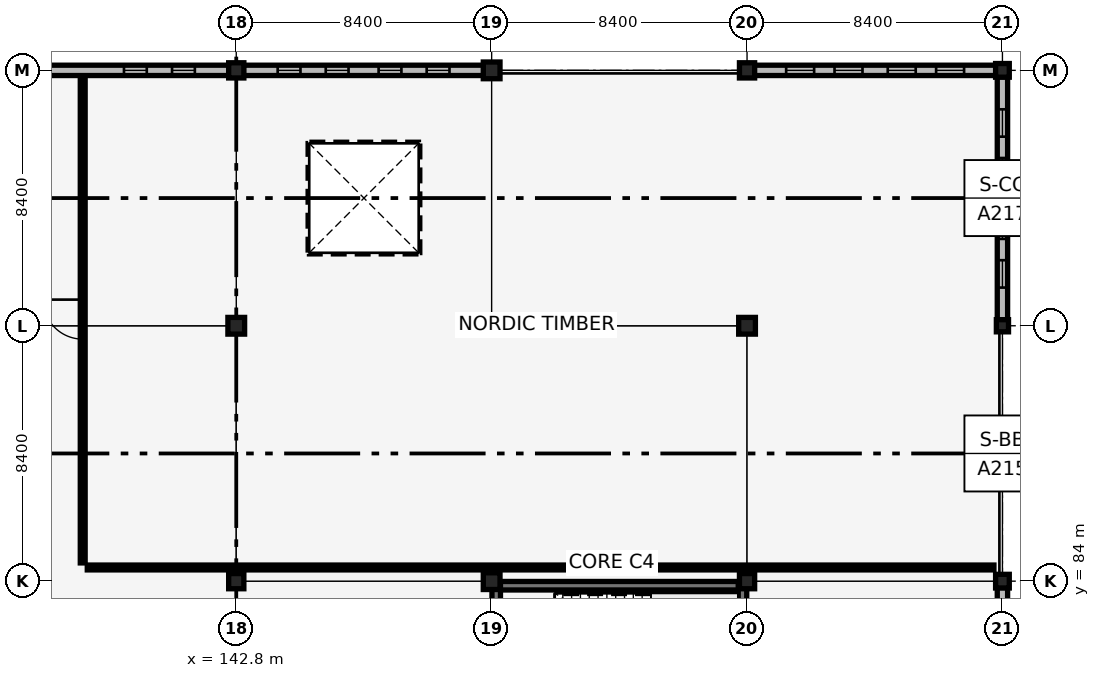
"""IFC4 building model, lengths in metres.
Left out: names, types, materials, properties, quantities, classifications, styles, units other than length and angle.
Written with IfcOpenShell. Run it as: python <this file> out.ifc"""

import sys

from ifc_helpers import new_model, si_unit, direction, frame, frame_2d, origin, origin_2d, place, context, subcontext, project, spatial, rectangle, extrude, element, fill, save


model = new_model("IFC4")
c1 = context("Model", 3, precision=1e-05, world=origin(), true_north=direction((0.0, 1.0)))
c2 = subcontext(c1, "Body", "Model", "MODEL_VIEW")
j1 = project(units=[si_unit("LENGTHUNIT", "METRE"), si_unit("PLANEANGLEUNIT", "RADIAN")], contexts=[c1])
p1 = place(None, origin())
s1 = spatial("IfcSite", under=j1, at=p1, CompositionType="ELEMENT")
p2 = place(p1, origin())
s2 = spatial("IfcBuilding", under=s1, at=p2, CompositionType="ELEMENT")
p3 = place(p2, frame((0.0, 0.0, 22.1)))
s3 = spatial("IfcBuildingStorey", under=s2, at=p3, CompositionType="ELEMENT", Elevation=22.1)
p4 = place(p3, frame((151.35, 83.85, 0.0), z_axis=(0.0, 0.0, 1.0), x_axis=(1.0, 0.0, 0.0)))
e1 = element("IfcWall", 1, at=p4, inside=s3, PredefinedType="SHEAR", context=c2, shape_type="SweptSolid", body=[
    extrude(rectangle(XDim=8.1, YDim=0.28, at=frame_2d((4.05, 0.0))), origin(), (0.0, 0.0, 1.0), 3.78),
])
p5 = place(p3, frame((151.35, 75.75, 0.0), z_axis=(0.0, 0.0, 1.0), x_axis=(0.0, 1.0, 0.0)))
e2 = element("IfcWall", 2, at=p5, inside=s3, PredefinedType="SHEAR", context=c2, shape_type="SweptSolid", body=[
    extrude(rectangle(XDim=8.1, YDim=0.28, at=frame_2d((4.05, 0.0))), origin(), (0.0, 0.0, 1.0), 3.78),
])
p6 = place(p5, frame((1.325, 0.0, 0.0)))
e3 = element("IfcOpeningElement", 3, at=p6, cuts=e2, PredefinedType="OPENING", context=c2, shape_type="SweptSolid", body=[
    extrude(rectangle(XDim=1.45, YDim=2.15, at=frame_2d((0.725, 1.075))), frame((0.0, 0.15, 0.0), z_axis=(0.0, -1.0, 0.0), x_axis=(1.0, 0.0, 0.0)), (0.0, 0.0, 1.0), 0.3),
])
p7 = place(p3, frame((159.45, 75.75, 0.0), z_axis=(0.0, 0.0, 1.0), x_axis=(0.0, 1.0, 0.0)))
e4 = element("IfcWall", 4, at=p7, inside=s3, PredefinedType="SHEAR", context=c2, shape_type="SweptSolid", body=[
    extrude(rectangle(XDim=8.1, YDim=0.28, at=frame_2d((4.05, 0.0))), origin(), (0.0, 0.0, 1.0), 3.78),
])
p8 = place(p3, frame((142.8, 84.0, 0.0), z_axis=(0.0, 0.0, 1.0), x_axis=(1.0, 0.0, 0.0)))
e5 = element("IfcColumn", 5, at=p8, inside=s3, PredefinedType="COLUMN", context=c2, shape_type="SweptSolid", body=[
    extrude(rectangle(XDim=0.5, YDim=0.5, at=origin_2d()), origin(), (0.0, 0.0, 1.0), 3.78),
])
p9 = place(p3, frame((142.8, 92.4, 0.0), z_axis=(0.0, 0.0, 1.0), x_axis=(1.0, 0.0, 0.0)))
e6 = element("IfcColumn", 6, at=p9, inside=s3, PredefinedType="COLUMN", context=c2, shape_type="SweptSolid", body=[
    extrude(rectangle(XDim=0.55, YDim=0.55, at=origin_2d()), origin(), (0.0, 0.0, 1.0), 3.78),
])
p10 = place(p3, frame((142.8, 100.8, 0.0), z_axis=(0.0, 0.0, 1.0), x_axis=(1.0, 0.0, 0.0)))
e7 = element("IfcColumn", 7, at=p10, inside=s3, PredefinedType="COLUMN", context=c2, shape_type="SweptSolid", body=[
    extrude(rectangle(XDim=0.5, YDim=0.5, at=origin_2d()), origin(), (0.0, 0.0, 1.0), 3.78),
])
p11 = place(p3, frame((151.2, 84.0, 0.0), z_axis=(0.0, 0.0, 1.0), x_axis=(1.0, 0.0, 0.0)))
e8 = element("IfcColumn", 8, at=p11, inside=s3, PredefinedType="COLUMN", context=c2, shape_type="SweptSolid", body=[
    extrude(rectangle(XDim=0.55, YDim=0.55, at=origin_2d()), origin(), (0.0, 0.0, 1.0), 3.78),
])
p12 = place(p3, frame((151.2, 92.4, 0.0), z_axis=(0.0, 0.0, 1.0), x_axis=(1.0, 0.0, 0.0)))
e9 = element("IfcColumn", 9, at=p12, inside=s3, PredefinedType="COLUMN", context=c2, shape_type="SweptSolid", body=[
    extrude(rectangle(XDim=0.52, YDim=0.52, at=origin_2d()), origin(), (0.0, 0.0, 1.0), 3.78),
])
p13 = place(p3, frame((151.2, 100.8, 0.0), z_axis=(0.0, 0.0, 1.0), x_axis=(1.0, 0.0, 0.0)))
e10 = element("IfcColumn", 10, at=p13, inside=s3, PredefinedType="COLUMN", context=c2, shape_type="SweptSolid", body=[
    extrude(rectangle(XDim=0.55, YDim=0.55, at=origin_2d()), origin(), (0.0, 0.0, 1.0), 3.78),
])
p14 = place(p3, frame((159.6, 84.0, 0.0), z_axis=(0.0, 0.0, 1.0), x_axis=(1.0, 0.0, 0.0)))
e11 = element("IfcColumn", 11, at=p14, inside=s3, PredefinedType="COLUMN", context=c2, shape_type="SweptSolid", body=[
    extrude(rectangle(XDim=0.5, YDim=0.5, at=origin_2d()), origin(), (0.0, 0.0, 1.0), 3.78),
])
p15 = place(p3, frame((159.6, 92.4, 0.0), z_axis=(0.0, 0.0, 1.0), x_axis=(1.0, 0.0, 0.0)))
e12 = element("IfcColumn", 12, at=p15, inside=s3, PredefinedType="COLUMN", context=c2, shape_type="SweptSolid", body=[
    extrude(rectangle(XDim=0.55, YDim=0.55, at=origin_2d()), origin(), (0.0, 0.0, 1.0), 3.78),
])
p16 = place(p3, frame((159.6, 100.8, 0.0), z_axis=(0.0, 0.0, 1.0), x_axis=(1.0, 0.0, 0.0)))
e13 = element("IfcColumn", 13, at=p16, inside=s3, PredefinedType="COLUMN", context=c2, shape_type="SweptSolid", body=[
    extrude(rectangle(XDim=0.5, YDim=0.5, at=origin_2d()), origin(), (0.0, 0.0, 1.0), 3.78),
])
p17 = place(p3, frame((168.0, 84.0, 0.0), z_axis=(0.0, 0.0, 1.0), x_axis=(1.0, 0.0, 0.0)))
e14 = element("IfcColumn", 14, at=p17, inside=s3, PredefinedType="COLUMN", context=c2, shape_type="SweptSolid", body=[
    extrude(rectangle(XDim=0.45, YDim=0.45, at=origin_2d()), origin(), (0.0, 0.0, 1.0), 3.78),
])
p18 = place(p3, frame((168.0, 92.4, 0.0), z_axis=(0.0, 0.0, 1.0), x_axis=(1.0, 0.0, 0.0)))
e15 = element("IfcColumn", 15, at=p18, inside=s3, PredefinedType="COLUMN", context=c2, shape_type="SweptSolid", body=[
    extrude(rectangle(XDim=0.4, YDim=0.4, at=origin_2d()), origin(), (0.0, 0.0, 1.0), 3.78),
])
p19 = place(p3, frame((168.0, 100.8, 0.0), z_axis=(0.0, 0.0, 1.0), x_axis=(1.0, 0.0, 0.0)))
e16 = element("IfcColumn", 16, at=p19, inside=s3, PredefinedType="COLUMN", context=c2, shape_type="SweptSolid", body=[
    extrude(rectangle(XDim=0.45, YDim=0.45, at=origin_2d()), origin(), (0.0, 0.0, 1.0), 3.78),
])
p20 = place(p3, frame((134.66, 100.8, 0.0), z_axis=(0.0, 0.0, 1.0), x_axis=(1.0, 0.0, 0.0)))
e17 = element("IfcWall", 17, at=p20, inside=s3, PredefinedType="SOLIDWALL", context=c2, shape_type="SweptSolid", body=[
    extrude(rectangle(XDim=7.905, YDim=0.34, at=frame_2d((3.953, 0.0))), origin(), (0.0, 0.0, 1.0), 3.18),
])
p21 = place(p20, frame((1.127, 0.0, 0.7)))
e18 = element("IfcOpeningElement", 18, at=p21, cuts=e17, PredefinedType="OPENING", context=c2, shape_type="SweptSolid", body=[
    extrude(rectangle(XDim=0.75, YDim=2.1, at=frame_2d((0.375, 1.05))), frame((0.0, 0.18, 0.0), z_axis=(0.0, -1.0, 0.0), x_axis=(1.0, 0.0, 0.0)), (0.0, 0.0, 1.0), 0.36),
])
p22 = place(p20, frame((4.447, 0.0, 0.7)))
e19 = element("IfcOpeningElement", 19, at=p22, cuts=e17, PredefinedType="OPENING", context=c2, shape_type="SweptSolid", body=[
    extrude(rectangle(XDim=0.75, YDim=2.1, at=frame_2d((0.375, 1.05))), frame((0.0, 0.18, 0.0), z_axis=(0.0, -1.0, 0.0), x_axis=(1.0, 0.0, 0.0)), (0.0, 0.0, 1.0), 0.36),
])
p23 = place(p20, frame((6.028, 0.0, 0.7)))
e20 = element("IfcOpeningElement", 20, at=p23, cuts=e17, PredefinedType="OPENING", context=c2, shape_type="SweptSolid", body=[
    extrude(rectangle(XDim=0.75, YDim=2.1, at=frame_2d((0.375, 1.05))), frame((0.0, 0.18, 0.0), z_axis=(0.0, -1.0, 0.0), x_axis=(1.0, 0.0, 0.0)), (0.0, 0.0, 1.0), 0.36),
])
p24 = place(p3, frame((143.035, 100.8, 0.0), z_axis=(0.0, 0.0, 1.0), x_axis=(1.0, 0.0, 0.0)))
e21 = element("IfcWall", 21, at=p24, inside=s3, PredefinedType="SOLIDWALL", context=c2, shape_type="SweptSolid", body=[
    extrude(rectangle(XDim=7.905, YDim=0.34, at=frame_2d((3.953, 0.0))), origin(), (0.0, 0.0, 1.0), 3.18),
])
p25 = place(p24, frame((1.127, 0.0, 0.7)))
e22 = element("IfcOpeningElement", 22, at=p25, cuts=e21, PredefinedType="OPENING", context=c2, shape_type="SweptSolid", body=[
    extrude(rectangle(XDim=0.75, YDim=2.1, at=frame_2d((0.375, 1.05))), frame((0.0, 0.18, 0.0), z_axis=(0.0, -1.0, 0.0), x_axis=(1.0, 0.0, 0.0)), (0.0, 0.0, 1.0), 0.36),
])
p26 = place(p24, frame((2.708, 0.0, 0.7)))
e23 = element("IfcOpeningElement", 23, at=p26, cuts=e21, PredefinedType="OPENING", context=c2, shape_type="SweptSolid", body=[
    extrude(rectangle(XDim=0.75, YDim=2.1, at=frame_2d((0.375, 1.05))), frame((0.0, 0.18, 0.0), z_axis=(0.0, -1.0, 0.0), x_axis=(1.0, 0.0, 0.0)), (0.0, 0.0, 1.0), 0.36),
])
p27 = place(p24, frame((4.447, 0.0, 0.7)))
e24 = element("IfcOpeningElement", 24, at=p27, cuts=e21, PredefinedType="OPENING", context=c2, shape_type="SweptSolid", body=[
    extrude(rectangle(XDim=0.75, YDim=2.1, at=frame_2d((0.375, 1.05))), frame((0.0, 0.18, 0.0), z_axis=(0.0, -1.0, 0.0), x_axis=(1.0, 0.0, 0.0)), (0.0, 0.0, 1.0), 0.36),
])
p28 = place(p24, frame((6.028, 0.0, 0.7)))
e25 = element("IfcOpeningElement", 25, at=p28, cuts=e21, PredefinedType="OPENING", context=c2, shape_type="SweptSolid", body=[
    extrude(rectangle(XDim=0.75, YDim=2.1, at=frame_2d((0.375, 1.05))), frame((0.0, 0.18, 0.0), z_axis=(0.0, -1.0, 0.0), x_axis=(1.0, 0.0, 0.0)), (0.0, 0.0, 1.0), 0.36),
])
p29 = place(p3, frame((168.0, 75.785, 0.0), z_axis=(0.0, 0.0, 1.0), x_axis=(0.0, 1.0, 0.0)))
e26 = element("IfcWall", 26, at=p29, inside=s3, PredefinedType="SOLIDWALL", context=c2, shape_type="SweptSolid", body=[
    extrude(rectangle(XDim=8.005, YDim=0.34, at=frame_2d((4.002, 0.0))), origin(), (0.0, 0.0, 1.0), 3.78),
])
p30 = place(p29, frame((1.121, 0.0, 0.75)))
e27 = element("IfcOpeningElement", 27, at=p30, cuts=e26, PredefinedType="OPENING", context=c2, shape_type="SweptSolid", body=[
    extrude(rectangle(XDim=0.8, YDim=2.55, at=frame_2d((0.4, 1.275))), frame((0.0, 0.18, 0.0), z_axis=(0.0, -1.0, 0.0), x_axis=(1.0, 0.0, 0.0)), (0.0, 0.0, 1.0), 0.36),
])
p31 = place(p29, frame((2.722, 0.0, 0.75)))
e28 = element("IfcOpeningElement", 28, at=p31, cuts=e26, PredefinedType="OPENING", context=c2, shape_type="SweptSolid", body=[
    extrude(rectangle(XDim=0.8, YDim=2.55, at=frame_2d((0.4, 1.275))), frame((0.0, 0.18, 0.0), z_axis=(0.0, -1.0, 0.0), x_axis=(1.0, 0.0, 0.0)), (0.0, 0.0, 1.0), 0.36),
])
p32 = place(p29, frame((4.483, 0.0, 0.75)))
e29 = element("IfcOpeningElement", 29, at=p32, cuts=e26, PredefinedType="OPENING", context=c2, shape_type="SweptSolid", body=[
    extrude(rectangle(XDim=0.8, YDim=2.55, at=frame_2d((0.4, 1.275))), frame((0.0, 0.18, 0.0), z_axis=(0.0, -1.0, 0.0), x_axis=(1.0, 0.0, 0.0)), (0.0, 0.0, 1.0), 0.36),
])
p33 = place(p29, frame((6.084, 0.0, 0.75)))
e30 = element("IfcOpeningElement", 30, at=p33, cuts=e26, PredefinedType="OPENING", context=c2, shape_type="SweptSolid", body=[
    extrude(rectangle(XDim=0.8, YDim=2.55, at=frame_2d((0.4, 1.275))), frame((0.0, 0.18, 0.0), z_axis=(0.0, -1.0, 0.0), x_axis=(1.0, 0.0, 0.0)), (0.0, 0.0, 1.0), 0.36),
])
p34 = place(p3, frame((159.835, 100.8, 0.0), z_axis=(0.0, 0.0, 1.0), x_axis=(1.0, 0.0, 0.0)))
e31 = element("IfcWall", 31, at=p34, inside=s3, PredefinedType="SOLIDWALL", context=c2, shape_type="SweptSolid", body=[
    extrude(rectangle(XDim=7.955, YDim=0.34, at=frame_2d((3.978, 0.0))), origin(), (0.0, 0.0, 1.0), 3.78),
])
p35 = place(p34, frame((1.052, 0.0, 0.75)))
e32 = element("IfcOpeningElement", 32, at=p35, cuts=e31, PredefinedType="OPENING", context=c2, shape_type="SweptSolid", body=[
    extrude(rectangle(XDim=0.92, YDim=2.5, at=frame_2d((0.46, 1.25))), frame((0.0, 0.18, 0.0), z_axis=(0.0, -1.0, 0.0), x_axis=(1.0, 0.0, 0.0)), (0.0, 0.0, 1.0), 0.36),
])
p36 = place(p34, frame((2.642, 0.0, 0.75)))
e33 = element("IfcOpeningElement", 33, at=p36, cuts=e31, PredefinedType="OPENING", context=c2, shape_type="SweptSolid", body=[
    extrude(rectangle(XDim=0.92, YDim=2.5, at=frame_2d((0.46, 1.25))), frame((0.0, 0.18, 0.0), z_axis=(0.0, -1.0, 0.0), x_axis=(1.0, 0.0, 0.0)), (0.0, 0.0, 1.0), 0.36),
])
p37 = place(p34, frame((4.393, 0.0, 0.75)))
e34 = element("IfcOpeningElement", 34, at=p37, cuts=e31, PredefinedType="OPENING", context=c2, shape_type="SweptSolid", body=[
    extrude(rectangle(XDim=0.92, YDim=2.5, at=frame_2d((0.46, 1.25))), frame((0.0, 0.18, 0.0), z_axis=(0.0, -1.0, 0.0), x_axis=(1.0, 0.0, 0.0)), (0.0, 0.0, 1.0), 0.36),
])
p38 = place(p34, frame((5.984, 0.0, 0.75)))
e35 = element("IfcOpeningElement", 35, at=p38, cuts=e31, PredefinedType="OPENING", context=c2, shape_type="SweptSolid", body=[
    extrude(rectangle(XDim=0.92, YDim=2.5, at=frame_2d((0.46, 1.25))), frame((0.0, 0.18, 0.0), z_axis=(0.0, -1.0, 0.0), x_axis=(1.0, 0.0, 0.0)), (0.0, 0.0, 1.0), 0.36),
])
p39 = place(p3, frame((168.0, 92.585, 0.0), z_axis=(0.0, 0.0, 1.0), x_axis=(0.0, 1.0, 0.0)))
e36 = element("IfcWall", 36, at=p39, inside=s3, PredefinedType="SOLIDWALL", context=c2, shape_type="SweptSolid", body=[
    extrude(rectangle(XDim=8.005, YDim=0.34, at=frame_2d((4.002, 0.0))), origin(), (0.0, 0.0, 1.0), 3.78),
])
p40 = place(p39, frame((1.071, 0.0, 0.75)))
e37 = element("IfcOpeningElement", 37, at=p40, cuts=e36, PredefinedType="OPENING", context=c2, shape_type="SweptSolid", body=[
    extrude(rectangle(XDim=0.9, YDim=2.65, at=frame_2d((0.45, 1.325))), frame((0.0, 0.18, 0.0), z_axis=(0.0, -1.0, 0.0), x_axis=(1.0, 0.0, 0.0)), (0.0, 0.0, 1.0), 0.36),
])
p41 = place(p39, frame((2.672, 0.0, 0.75)))
e38 = element("IfcOpeningElement", 38, at=p41, cuts=e36, PredefinedType="OPENING", context=c2, shape_type="SweptSolid", body=[
    extrude(rectangle(XDim=0.9, YDim=2.65, at=frame_2d((0.45, 1.325))), frame((0.0, 0.18, 0.0), z_axis=(0.0, -1.0, 0.0), x_axis=(1.0, 0.0, 0.0)), (0.0, 0.0, 1.0), 0.36),
])
p42 = place(p39, frame((4.433, 0.0, 0.75)))
e39 = element("IfcOpeningElement", 39, at=p42, cuts=e36, PredefinedType="OPENING", context=c2, shape_type="SweptSolid", body=[
    extrude(rectangle(XDim=0.9, YDim=2.65, at=frame_2d((0.45, 1.325))), frame((0.0, 0.18, 0.0), z_axis=(0.0, -1.0, 0.0), x_axis=(1.0, 0.0, 0.0)), (0.0, 0.0, 1.0), 0.36),
])
p43 = place(p39, frame((6.034, 0.0, 0.75)))
e40 = element("IfcOpeningElement", 40, at=p43, cuts=e36, PredefinedType="OPENING", context=c2, shape_type="SweptSolid", body=[
    extrude(rectangle(XDim=0.9, YDim=2.65, at=frame_2d((0.45, 1.325))), frame((0.0, 0.18, 0.0), z_axis=(0.0, -1.0, 0.0), x_axis=(1.0, 0.0, 0.0)), (0.0, 0.0, 1.0), 0.36),
])
p44 = place(p3, frame((137.75, 84.6, 0.0), z_axis=(0.0, 0.0, 1.0), x_axis=(0.0, 1.0, 0.0)))
e41 = element("IfcWall", 41, at=p44, inside=s3, PredefinedType="PARTITIONING", context=c2, shape_type="SweptSolid", body=[
    extrude(rectangle(XDim=16.02, YDim=0.16, at=frame_2d((8.01, 0.0))), origin(), (0.0, 0.0, 1.0), 3.16),
])
p45 = place(p44, frame((7.36, 0.0, 0.0)))
e42 = element("IfcOpeningElement", 42, at=p45, cuts=e41, PredefinedType="OPENING", context=c2, shape_type="SweptSolid", body=[
    extrude(rectangle(XDim=1.3, YDim=2.2, at=frame_2d((0.65, 1.1))), frame((0.0, 0.09, 0.0), z_axis=(0.0, -1.0, 0.0), x_axis=(1.0, 0.0, 0.0)), (0.0, 0.0, 1.0), 0.18),
])
p46 = place(p3, frame((137.9, 84.45, 0.0), z_axis=(0.0, 0.0, 1.0), x_axis=(1.0, 0.0, 0.0)))
e43 = element("IfcWall", 43, at=p46, inside=s3, PredefinedType="PARTITIONING", context=c2, shape_type="SweptSolid", body=[
    extrude(rectangle(XDim=29.82, YDim=0.16, at=frame_2d((14.91, 0.0))), origin(), (0.0, 0.0, 1.0), 3.13),
])
p47 = place(p22, origin())
e44 = element("IfcWindow", 44, at=p47, inside=s3, PartitioningType="DOUBLE_PANEL_VERTICAL", PredefinedType="WINDOW", context=c2, shape_type="SweptSolid", body=[
    extrude(rectangle(XDim=0.75, YDim=2.1, at=frame_2d((0.375, 1.05))), frame((0.0, 0.03, 0.0), z_axis=(0.0, -1.0, 0.0), x_axis=(1.0, 0.0, 0.0)), (0.0, 0.0, 1.0), 0.06),
])
fill(e19, e44)
p48 = place(p23, origin())
e45 = element("IfcWindow", 45, at=p48, inside=s3, PartitioningType="DOUBLE_PANEL_VERTICAL", PredefinedType="WINDOW", context=c2, shape_type="SweptSolid", body=[
    extrude(rectangle(XDim=0.75, YDim=2.1, at=frame_2d((0.375, 1.05))), frame((0.0, 0.03, 0.0), z_axis=(0.0, -1.0, 0.0), x_axis=(1.0, 0.0, 0.0)), (0.0, 0.0, 1.0), 0.06),
])
fill(e20, e45)
p49 = place(p25, origin())
e46 = element("IfcWindow", 46, at=p49, inside=s3, PartitioningType="DOUBLE_PANEL_VERTICAL", PredefinedType="WINDOW", context=c2, shape_type="SweptSolid", body=[
    extrude(rectangle(XDim=0.75, YDim=2.1, at=frame_2d((0.375, 1.05))), frame((0.0, 0.03, 0.0), z_axis=(0.0, -1.0, 0.0), x_axis=(1.0, 0.0, 0.0)), (0.0, 0.0, 1.0), 0.06),
])
fill(e22, e46)
p50 = place(p26, origin())
e47 = element("IfcWindow", 47, at=p50, inside=s3, PartitioningType="DOUBLE_PANEL_VERTICAL", PredefinedType="WINDOW", context=c2, shape_type="SweptSolid", body=[
    extrude(rectangle(XDim=0.75, YDim=2.1, at=frame_2d((0.375, 1.05))), frame((0.0, 0.03, 0.0), z_axis=(0.0, -1.0, 0.0), x_axis=(1.0, 0.0, 0.0)), (0.0, 0.0, 1.0), 0.06),
])
fill(e23, e47)
p51 = place(p27, origin())
e48 = element("IfcWindow", 48, at=p51, inside=s3, PartitioningType="DOUBLE_PANEL_VERTICAL", PredefinedType="WINDOW", context=c2, shape_type="SweptSolid", body=[
    extrude(rectangle(XDim=0.75, YDim=2.1, at=frame_2d((0.375, 1.05))), frame((0.0, 0.03, 0.0), z_axis=(0.0, -1.0, 0.0), x_axis=(1.0, 0.0, 0.0)), (0.0, 0.0, 1.0), 0.06),
])
fill(e24, e48)
p52 = place(p28, origin())
e49 = element("IfcWindow", 49, at=p52, inside=s3, PartitioningType="DOUBLE_PANEL_VERTICAL", PredefinedType="WINDOW", context=c2, shape_type="SweptSolid", body=[
    extrude(rectangle(XDim=0.75, YDim=2.1, at=frame_2d((0.375, 1.05))), frame((0.0, 0.03, 0.0), z_axis=(0.0, -1.0, 0.0), x_axis=(1.0, 0.0, 0.0)), (0.0, 0.0, 1.0), 0.06),
])
fill(e25, e49)
p53 = place(p35, origin())
e50 = element("IfcWindow", 50, at=p53, inside=s3, PartitioningType="DOUBLE_PANEL_VERTICAL", PredefinedType="WINDOW", context=c2, shape_type="SweptSolid", body=[
    extrude(rectangle(XDim=0.92, YDim=2.5, at=frame_2d((0.46, 1.25))), frame((0.0, 0.03, 0.0), z_axis=(0.0, -1.0, 0.0), x_axis=(1.0, 0.0, 0.0)), (0.0, 0.0, 1.0), 0.06),
])
fill(e32, e50)
p54 = place(p36, origin())
e51 = element("IfcWindow", 51, at=p54, inside=s3, PartitioningType="DOUBLE_PANEL_VERTICAL", PredefinedType="WINDOW", context=c2, shape_type="SweptSolid", body=[
    extrude(rectangle(XDim=0.92, YDim=2.5, at=frame_2d((0.46, 1.25))), frame((0.0, 0.03, 0.0), z_axis=(0.0, -1.0, 0.0), x_axis=(1.0, 0.0, 0.0)), (0.0, 0.0, 1.0), 0.06),
])
fill(e33, e51)
p55 = place(p37, origin())
e52 = element("IfcWindow", 52, at=p55, inside=s3, PartitioningType="DOUBLE_PANEL_VERTICAL", PredefinedType="WINDOW", context=c2, shape_type="SweptSolid", body=[
    extrude(rectangle(XDim=0.92, YDim=2.5, at=frame_2d((0.46, 1.25))), frame((0.0, 0.03, 0.0), z_axis=(0.0, -1.0, 0.0), x_axis=(1.0, 0.0, 0.0)), (0.0, 0.0, 1.0), 0.06),
])
fill(e34, e52)
p56 = place(p38, origin())
e53 = element("IfcWindow", 53, at=p56, inside=s3, PartitioningType="DOUBLE_PANEL_VERTICAL", PredefinedType="WINDOW", context=c2, shape_type="SweptSolid", body=[
    extrude(rectangle(XDim=0.92, YDim=2.5, at=frame_2d((0.46, 1.25))), frame((0.0, 0.03, 0.0), z_axis=(0.0, -1.0, 0.0), x_axis=(1.0, 0.0, 0.0)), (0.0, 0.0, 1.0), 0.06),
])
fill(e35, e53)
p57 = place(p40, origin())
e54 = element("IfcWindow", 54, at=p57, inside=s3, PartitioningType="DOUBLE_PANEL_VERTICAL", PredefinedType="WINDOW", context=c2, shape_type="SweptSolid", body=[
    extrude(rectangle(XDim=0.9, YDim=2.65, at=frame_2d((0.45, 1.325))), frame((0.0, 0.03, 0.0), z_axis=(0.0, -1.0, 0.0), x_axis=(1.0, 0.0, 0.0)), (0.0, 0.0, 1.0), 0.06),
])
fill(e37, e54)
p58 = place(p41, origin())
e55 = element("IfcWindow", 55, at=p58, inside=s3, PartitioningType="DOUBLE_PANEL_VERTICAL", PredefinedType="WINDOW", context=c2, shape_type="SweptSolid", body=[
    extrude(rectangle(XDim=0.9, YDim=2.65, at=frame_2d((0.45, 1.325))), frame((0.0, 0.03, 0.0), z_axis=(0.0, -1.0, 0.0), x_axis=(1.0, 0.0, 0.0)), (0.0, 0.0, 1.0), 0.06),
])
fill(e38, e55)
p59 = place(p42, origin())
e56 = element("IfcWindow", 56, at=p59, inside=s3, PartitioningType="DOUBLE_PANEL_VERTICAL", PredefinedType="WINDOW", context=c2, shape_type="SweptSolid", body=[
    extrude(rectangle(XDim=0.9, YDim=2.65, at=frame_2d((0.45, 1.325))), frame((0.0, 0.03, 0.0), z_axis=(0.0, -1.0, 0.0), x_axis=(1.0, 0.0, 0.0)), (0.0, 0.0, 1.0), 0.06),
])
fill(e39, e56)
p60 = place(p43, origin())
e57 = element("IfcWindow", 57, at=p60, inside=s3, PartitioningType="DOUBLE_PANEL_VERTICAL", PredefinedType="WINDOW", context=c2, shape_type="SweptSolid", body=[
    extrude(rectangle(XDim=0.9, YDim=2.65, at=frame_2d((0.45, 1.325))), frame((0.0, 0.03, 0.0), z_axis=(0.0, -1.0, 0.0), x_axis=(1.0, 0.0, 0.0)), (0.0, 0.0, 1.0), 0.06),
])
fill(e40, e57)
p61 = place(p45, origin())
e58 = element("IfcDoor", 58, at=p61, inside=s3, OperationType="SINGLE_SWING_RIGHT", PredefinedType="DOOR", context=c2, shape_type="SweptSolid", body=[
    extrude(rectangle(XDim=1.3, YDim=2.2, at=frame_2d((0.65, 1.1))), frame((0.0, 0.025, 0.0), z_axis=(0.0, -1.0, 0.0), x_axis=(1.0, 0.0, 0.0)), (0.0, 0.0, 1.0), 0.05),
])
fill(e42, e58)
save(model, sys.argv[1])
